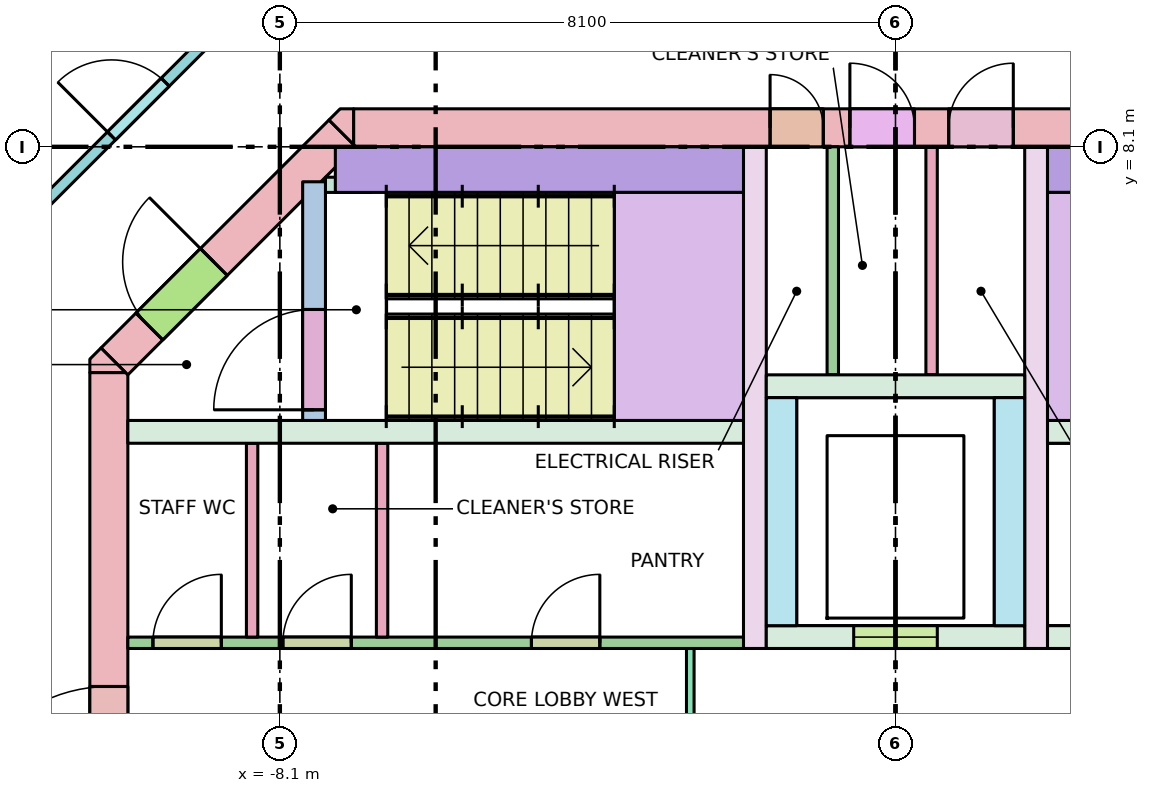
"""IFC4 building model, lengths in metres.
Left out: names, types, materials, properties, quantities, classifications, styles, units other than length and angle.
Written with IfcOpenShell. Run it as: python <this file> out.ifc"""

import sys

from ifc_helpers import new_model, si_unit, direction, frame, frame_2d, origin, place, context, subcontext, project, spatial, polyline, rectangle, outline, extrude, element, fill, save


model = new_model("IFC4")
c1 = context("Model", 3, precision=1e-05, world=origin(), true_north=direction((0.0, 1.0)))
c2 = subcontext(c1, "Body", "Model", "MODEL_VIEW")
j1 = project(units=[si_unit("LENGTHUNIT", "METRE"), si_unit("PLANEANGLEUNIT", "RADIAN")], contexts=[c1])
p1 = place(None, origin())
s1 = spatial("IfcSite", under=j1, at=p1, CompositionType="ELEMENT")
p2 = place(p1, origin())
s2 = spatial("IfcBuilding", under=s1, at=p2, CompositionType="ELEMENT")
p3 = place(p2, frame((0.0, 0.0, 253.8)))
s3 = spatial("IfcBuildingStorey", under=s2, at=p3, CompositionType="ELEMENT", Elevation=253.8)
p4 = place(p3, frame((-7.13, 8.35, -0.28), z_axis=(0.0, 0.0, 1.0), x_axis=(1.0, 0.0, 0.0)))
e1 = element("IfcWall", 1, at=p4, inside=s3, PredefinedType="SHEAR", context=c2, shape_type="SweptSolid", body=[
    extrude(rectangle(XDim=14.26, YDim=0.5, at=frame_2d((7.13, 0.0))), origin(), (0.0, 0.0, 1.0), 3.7),
])
p5 = place(p4, frame((5.48, 0.0, 0.28)))
e2 = element("IfcOpeningElement", 2, at=p5, cuts=e1, PredefinedType="OPENING", context=c2, shape_type="SweptSolid", body=[
    extrude(rectangle(XDim=0.7, YDim=2.1, at=frame_2d((0.35, 1.05))), frame((0.0, 0.26, 0.0), z_axis=(0.0, -1.0, 0.0), x_axis=(1.0, 0.0, 0.0)), (0.0, 0.0, 1.0), 0.52),
])
p6 = place(p4, frame((6.53, 0.0, 0.28)))
e3 = element("IfcOpeningElement", 3, at=p6, cuts=e1, PredefinedType="OPENING", context=c2, shape_type="SweptSolid", body=[
    extrude(rectangle(XDim=0.85, YDim=2.1, at=frame_2d((0.425, 1.05))), frame((0.0, 0.26, 0.0), z_axis=(0.0, -1.0, 0.0), x_axis=(1.0, 0.0, 0.0)), (0.0, 0.0, 1.0), 0.52),
])
p7 = place(p4, frame((7.83, 0.0, 0.28)))
e4 = element("IfcOpeningElement", 4, at=p7, cuts=e1, PredefinedType="OPENING", context=c2, shape_type="SweptSolid", body=[
    extrude(rectangle(XDim=0.85, YDim=2.1, at=frame_2d((0.425, 1.05))), frame((0.0, 0.26, 0.0), z_axis=(0.0, -1.0, 0.0), x_axis=(1.0, 0.0, 0.0)), (0.0, 0.0, 1.0), 0.52),
])
p8 = place(p3, frame((-10.35, -5.13, -0.28), z_axis=(0.0, 0.0, 1.0), x_axis=(0.0, 1.0, 0.0)))
e5 = element("IfcWall", 5, at=p8, inside=s3, PredefinedType="SHEAR", context=c2, shape_type="SweptSolid", body=[
    extrude(rectangle(XDim=10.26, YDim=0.5, at=frame_2d((5.13, 0.0))), origin(), (0.0, 0.0, 1.0), 3.7),
])
p9 = place(p8, frame((4.13, 0.0, 0.28)))
e6 = element("IfcOpeningElement", 6, at=p9, cuts=e5, PredefinedType="OPENING", context=c2, shape_type="SweptSolid", body=[
    extrude(rectangle(XDim=2.0, YDim=2.1, at=frame_2d((1.0, 1.05))), frame((0.0, 0.26, 0.0), z_axis=(0.0, -1.0, 0.0), x_axis=(1.0, 0.0, 0.0)), (0.0, 0.0, 1.0), 0.52),
])
p10 = place(p3, frame((-10.277, 5.277, -0.28), z_axis=(0.0, 0.0, 1.0), x_axis=(0.707106781187, 0.707106781187, 0.0)))
e7 = element("IfcWall", 7, at=p10, inside=s3, PredefinedType="SHEAR", context=c2, shape_type="SweptSolid", body=[
    extrude(rectangle(XDim=4.243, YDim=0.5, at=frame_2d((2.121, 0.0))), origin(), (0.0, 0.0, 1.0), 3.7),
])
p11 = place(p10, frame((0.65, 0.0, 0.28)))
e8 = element("IfcOpeningElement", 8, at=p11, cuts=e7, PredefinedType="OPENING", context=c2, shape_type="SweptSolid", body=[
    extrude(rectangle(XDim=1.2, YDim=2.1, at=frame_2d((0.6, 1.05))), frame((0.0, 0.26, 0.0), z_axis=(0.0, -1.0, 0.0), x_axis=(1.0, 0.0, 0.0)), (0.0, 0.0, 1.0), 0.52),
])
p12 = place(p3, frame((0.0, 0.0, -0.28)))
e9 = element("IfcWall", 9, at=p12, inside=s3, PredefinedType="SHEAR", context=c2, shape_type="SweptSolid", body=[
    extrude(outline(polyline([(-10.454, 5.454), (-10.13, 5.13), (-10.6, 5.13), (-10.6, 5.307), (-10.454, 5.454)])), origin(), (0.0, 0.0, 1.0), 3.7),
])
p13 = place(p3, frame((0.0, 0.0, -0.28)))
e10 = element("IfcWall", 10, at=p13, inside=s3, PredefinedType="SHEAR", context=c2, shape_type="SweptSolid", body=[
    extrude(outline(polyline([(-7.307, 8.6), (-7.13, 8.6), (-7.13, 8.13), (-7.454, 8.454), (-7.307, 8.6)])), origin(), (0.0, 0.0, 1.0), 3.7),
])
for number, where, z_axis, x_axis in (
    (11, (-10.1, 4.35, 0.0), (0.0, 0.0, 1.0), (1.0, 0.0, 0.0)),
    (12, (2.0, 4.35, 0.0), (0.0, 0.0, 1.0), (1.0, 0.0, 0.0)),
):
    element("IfcWall", number, at=place(p3, frame(where, z_axis=z_axis, x_axis=x_axis)), inside=s3, PredefinedType="SOLIDWALL", context=c2, shape_type="SweptSolid", body=[
        extrude(rectangle(XDim=8.1, YDim=0.3, at=frame_2d((4.05, 0.0))), origin(), (0.0, 0.0, 1.0), 3.42),
    ])
p14 = place(p3, frame((2.0, 1.65, 0.0), z_axis=(0.0, 0.0, 1.0), x_axis=(1.0, 0.0, 0.0)))
e13 = element("IfcWall", 13, at=p14, inside=s3, PredefinedType="SOLIDWALL", context=c2, shape_type="SweptSolid", body=[
    extrude(rectangle(XDim=8.1, YDim=0.3, at=frame_2d((4.05, 0.0))), origin(), (0.0, 0.0, 1.0), 3.42),
])
p15 = place(p14, frame((0.85, 0.0, 0.0)))
e14 = element("IfcOpeningElement", 14, at=p15, cuts=e13, PredefinedType="OPENING", context=c2, shape_type="SweptSolid", body=[
    extrude(rectangle(XDim=1.1, YDim=2.1, at=frame_2d((0.55, 1.05))), frame((0.0, 0.16, 0.0), z_axis=(0.0, -1.0, 0.0), x_axis=(1.0, 0.0, 0.0)), (0.0, 0.0, 1.0), 0.32),
])
p16 = place(p14, frame((3.5, 0.0, 0.0)))
e15 = element("IfcOpeningElement", 15, at=p16, cuts=e13, PredefinedType="OPENING", context=c2, shape_type="SweptSolid", body=[
    extrude(rectangle(XDim=1.1, YDim=2.1, at=frame_2d((0.55, 1.05))), frame((0.0, 0.16, 0.0), z_axis=(0.0, -1.0, 0.0), x_axis=(1.0, 0.0, 0.0)), (0.0, 0.0, 1.0), 0.32),
])
p17 = place(p14, frame((6.3, 0.0, 0.0)))
e16 = element("IfcOpeningElement", 16, at=p17, cuts=e13, PredefinedType="OPENING", context=c2, shape_type="SweptSolid", body=[
    extrude(rectangle(XDim=1.1, YDim=2.1, at=frame_2d((0.55, 1.05))), frame((0.0, 0.16, 0.0), z_axis=(0.0, -1.0, 0.0), x_axis=(1.0, 0.0, 0.0)), (0.0, 0.0, 1.0), 0.32),
])
for number, where, z_axis, x_axis in (
    (17, (-1.85, 1.5, 0.0), (0.0, 0.0, 1.0), (0.0, 1.0, 0.0)),
    (18, (1.85, 1.5, 0.0), (0.0, 0.0, 1.0), (0.0, 1.0, 0.0)),
):
    element("IfcWall", number, at=place(p3, frame(where, z_axis=z_axis, x_axis=x_axis)), inside=s3, PredefinedType="SHEAR", context=c2, shape_type="SweptSolid", body=[
        extrude(rectangle(XDim=6.6, YDim=0.3, at=frame_2d((3.3, 0.0))), origin(), (0.0, 0.0, 1.0), 3.42),
    ])
p18 = place(p3, frame((-1.7, 1.65, 0.0), z_axis=(0.0, 0.0, 1.0), x_axis=(1.0, 0.0, 0.0)))
e19 = element("IfcWall", 19, at=p18, inside=s3, PredefinedType="SOLIDWALL", context=c2, shape_type="SweptSolid", body=[
    extrude(rectangle(XDim=3.4, YDim=0.3, at=frame_2d((1.7, 0.0))), origin(), (0.0, 0.0, 1.0), 3.42),
])
p19 = place(p18, frame((1.15, 0.0, 0.0)))
e20 = element("IfcOpeningElement", 20, at=p19, cuts=e19, PredefinedType="OPENING", context=c2, shape_type="SweptSolid", body=[
    extrude(rectangle(XDim=1.1, YDim=2.1, at=frame_2d((0.55, 1.05))), frame((0.0, 0.16, 0.0), z_axis=(0.0, -1.0, 0.0), x_axis=(1.0, 0.0, 0.0)), (0.0, 0.0, 1.0), 0.32),
])
for number, where, z_axis, x_axis in (
    (21, (-1.5, 1.8, 0.0), (0.0, 0.0, 1.0), (0.0, 1.0, 0.0)),
    (22, (1.5, 1.8, 0.0), (0.0, 0.0, 1.0), (0.0, 1.0, 0.0)),
):
    element("IfcWall", number, at=place(p3, frame(where, z_axis=z_axis, x_axis=x_axis)), inside=s3, PredefinedType="SOLIDWALL", context=c2, shape_type="SweptSolid", body=[
        extrude(rectangle(XDim=3.0, YDim=0.4, at=frame_2d((1.5, 0.0))), origin(), (0.0, 0.0, 1.0), 3.42),
    ])
p20 = place(p3, frame((-1.7, 4.95, 0.0), z_axis=(0.0, 0.0, 1.0), x_axis=(1.0, 0.0, 0.0)))
e23 = element("IfcWall", 23, at=p20, inside=s3, PredefinedType="SOLIDWALL", context=c2, shape_type="SweptSolid", body=[
    extrude(rectangle(XDim=3.4, YDim=0.3, at=frame_2d((1.7, 0.0))), origin(), (0.0, 0.0, 1.0), 3.42),
])
p21 = place(p3, frame((-7.65, 4.5, 0.0), z_axis=(0.0, 0.0, 1.0), x_axis=(0.0, 1.0, 0.0)))
e24 = element("IfcWall", 24, at=p21, inside=s3, PredefinedType="SHEAR", context=c2, shape_type="SweptSolid", body=[
    extrude(rectangle(XDim=3.14, YDim=0.3, at=frame_2d((1.57, 0.0))), origin(), (0.0, 0.0, 1.0), 3.42),
])
p22 = place(p21, frame((0.14, 0.0, 0.0)))
e25 = element("IfcOpeningElement", 25, at=p22, cuts=e24, PredefinedType="OPENING", context=c2, shape_type="SweptSolid", body=[
    extrude(rectangle(XDim=1.32, YDim=2.1, at=frame_2d((0.66, 1.05))), frame((0.0, 0.16, 0.0), z_axis=(0.0, -1.0, 0.0), x_axis=(1.0, 0.0, 0.0)), (0.0, 0.0, 1.0), 0.32),
])
for number, where, z_axis, x_axis in (
    (26, (-7.37, 7.8, 0.0), (0.0, 0.0, 1.0), (1.0, 0.0, 0.0)),
    (27, (2.0, 7.8, 0.0), (0.0, 0.0, 1.0), (1.0, 0.0, 0.0)),
):
    element("IfcWall", number, at=place(p3, frame(where, z_axis=z_axis, x_axis=x_axis)), inside=s3, PredefinedType="SHEAR", context=c2, shape_type="SweptSolid", body=[
        extrude(rectangle(XDim=5.37, YDim=0.6, at=frame_2d((2.685, 0.0))), origin(), (0.0, 0.0, 1.0), 3.42),
    ])
p23 = place(p3, frame((-7.5, 7.6, 0.0), z_axis=(0.0, 0.0, 1.0), x_axis=(1.0, 0.0, 0.0)))
e28 = element("IfcWall", 28, at=p23, inside=s3, PredefinedType="SHEAR", context=c2, shape_type="SweptSolid", body=[
    extrude(rectangle(XDim=0.6, YDim=0.2, at=frame_2d((0.3, 0.0))), origin(), (0.0, 0.0, 1.0), 3.42),
])
p24 = place(p3, frame((-2.7, -1.5, 0.0), z_axis=(0.0, 0.0, 1.0), x_axis=(0.0, 1.0, 0.0)))
e29 = element("IfcWall", 29, at=p24, inside=s3, PredefinedType="PARTITIONING", context=c2, shape_type="SweptSolid", body=[
    extrude(rectangle(XDim=3.0, YDim=0.1, at=frame_2d((1.5, 0.0))), origin(), (0.0, 0.0, 1.0), 3.42),
])
p25 = place(p24, frame((0.9, 0.0, 0.0)))
e30 = element("IfcOpeningElement", 30, at=p25, cuts=e29, PredefinedType="OPENING", context=c2, shape_type="SweptSolid", body=[
    extrude(rectangle(XDim=1.2, YDim=2.1, at=frame_2d((0.6, 1.05))), frame((0.0, 0.06, 0.0), z_axis=(0.0, -1.0, 0.0), x_axis=(1.0, 0.0, 0.0)), (0.0, 0.0, 1.0), 0.12),
])
for number, where, z_axis, x_axis in (
    (31, (-0.825, 5.1, 0.0), (0.0, 0.0, 1.0), (0.0, 1.0, 0.0)),
    (32, (0.475, 5.1, 0.0), (0.0, 0.0, 1.0), (0.0, 1.0, 0.0)),
):
    element("IfcWall", number, at=place(p3, frame(where, z_axis=z_axis, x_axis=x_axis)), inside=s3, PredefinedType="PARTITIONING", context=c2, shape_type="SweptSolid", body=[
        extrude(rectangle(XDim=3.0, YDim=0.15, at=frame_2d((1.5, 0.0))), origin(), (0.0, 0.0, 1.0), 3.42),
    ])
for number, where, z_axis, x_axis in (
    (33, (-8.465, 1.65, 0.0), (0.0, 0.0, 1.0), (0.0, 1.0, 0.0)),
    (34, (-6.755, 1.65, 0.0), (0.0, 0.0, 1.0), (0.0, 1.0, 0.0)),
):
    element("IfcWall", number, at=place(p3, frame(where, z_axis=z_axis, x_axis=x_axis)), inside=s3, PredefinedType="PARTITIONING", context=c2, shape_type="SweptSolid", body=[
        extrude(rectangle(XDim=2.55, YDim=0.15, at=frame_2d((1.275, 0.0))), origin(), (0.0, 0.0, 1.0), 3.42),
    ])
p26 = place(p3, frame((-10.1, 1.575, 0.0), z_axis=(0.0, 0.0, 1.0), x_axis=(1.0, 0.0, 0.0)))
e35 = element("IfcWall", 35, at=p26, inside=s3, PredefinedType="PARTITIONING", context=c2, shape_type="SweptSolid", body=[
    extrude(rectangle(XDim=8.1, YDim=0.15, at=frame_2d((4.05, 0.0))), origin(), (0.0, 0.0, 1.0), 3.42),
])
p27 = place(p26, frame((0.33, 0.0, 0.0)))
e36 = element("IfcOpeningElement", 36, at=p27, cuts=e35, PredefinedType="OPENING", context=c2, shape_type="SweptSolid", body=[
    extrude(rectangle(XDim=0.9, YDim=2.1, at=frame_2d((0.45, 1.05))), frame((0.0, 0.085, 0.0), z_axis=(0.0, -1.0, 0.0), x_axis=(1.0, 0.0, 0.0)), (0.0, 0.0, 1.0), 0.17),
])
p28 = place(p26, frame((2.04, 0.0, 0.0)))
e37 = element("IfcOpeningElement", 37, at=p28, cuts=e35, PredefinedType="OPENING", context=c2, shape_type="SweptSolid", body=[
    extrude(rectangle(XDim=0.9, YDim=2.1, at=frame_2d((0.45, 1.05))), frame((0.0, 0.085, 0.0), z_axis=(0.0, -1.0, 0.0), x_axis=(1.0, 0.0, 0.0)), (0.0, 0.0, 1.0), 0.17),
])
p29 = place(p26, frame((5.31, 0.0, 0.0)))
e38 = element("IfcOpeningElement", 38, at=p29, cuts=e35, PredefinedType="OPENING", context=c2, shape_type="SweptSolid", body=[
    extrude(rectangle(XDim=0.9, YDim=2.1, at=frame_2d((0.45, 1.05))), frame((0.0, 0.085, 0.0), z_axis=(0.0, -1.0, 0.0), x_axis=(1.0, 0.0, 0.0)), (0.0, 0.0, 1.0), 0.17),
])
p30 = place(p3, frame((-12.438, 6.121, 0.0), z_axis=(0.0, 0.0, 1.0), x_axis=(0.707106781187, 0.707106781187, 0.0)))
e39 = element("IfcWall", 39, at=p30, inside=s3, PredefinedType="PARTITIONING", context=c2, shape_type="SweptSolid", body=[
    extrude(rectangle(XDim=6.105, YDim=0.15, at=frame_2d((3.053, 0.0))), origin(), (0.0, 0.0, 1.0), 2.57),
])
p31 = place(p30, frame((3.002, 0.0, 0.0)))
e40 = element("IfcOpeningElement", 40, at=p31, cuts=e39, PredefinedType="OPENING", context=c2, shape_type="SweptSolid", body=[
    extrude(rectangle(XDim=1.0, YDim=2.1, at=frame_2d((0.5, 1.05))), frame((0.0, 0.085, 0.0), z_axis=(0.0, -1.0, 0.0), x_axis=(1.0, 0.0, 0.0)), (0.0, 0.0, 1.0), 0.17),
])
p32 = place(p19, origin())
e41 = element("IfcDoor", 41, at=p32, inside=s3, OperationType="DOUBLE_DOOR_SLIDING", PredefinedType="DOOR", context=c2, shape_type="SweptSolid", body=[
    extrude(rectangle(XDim=1.1, YDim=2.1, at=frame_2d((0.55, 1.05))), frame((0.0, 0.025, 0.0), z_axis=(0.0, -1.0, 0.0), x_axis=(1.0, 0.0, 0.0)), (0.0, 0.0, 1.0), 0.05),
])
fill(e20, e41)
p33 = place(p22, origin())
e42 = element("IfcDoor", 42, at=p33, inside=s3, OperationType="DOUBLE_DOOR_SINGLE_SWING", PredefinedType="DOOR", context=c2, shape_type="SweptSolid", body=[
    extrude(rectangle(XDim=1.32, YDim=2.1, at=frame_2d((0.66, 1.05))), frame((0.0, 0.025, 0.0), z_axis=(0.0, -1.0, 0.0), x_axis=(1.0, 0.0, 0.0)), (0.0, 0.0, 1.0), 0.05),
])
fill(e25, e42)
p34 = place(p11, origin())
e43 = element("IfcDoor", 43, at=p34, inside=s3, OperationType="SINGLE_SWING_RIGHT", PredefinedType="DOOR", context=c2, shape_type="SweptSolid", body=[
    extrude(rectangle(XDim=1.2, YDim=2.1, at=frame_2d((0.6, 1.05))), frame((0.0, 0.025, 0.0), z_axis=(0.0, -1.0, 0.0), x_axis=(1.0, 0.0, 0.0)), (0.0, 0.0, 1.0), 0.05),
])
fill(e8, e43)
p35 = place(p9, origin())
e44 = element("IfcDoor", 44, at=p35, inside=s3, OperationType="DOUBLE_DOOR_SINGLE_SWING", PredefinedType="DOOR", context=c2, shape_type="SweptSolid", body=[
    extrude(rectangle(XDim=2.0, YDim=2.1, at=frame_2d((1.0, 1.05))), frame((0.0, 0.025, 0.0), z_axis=(0.0, -1.0, 0.0), x_axis=(1.0, 0.0, 0.0)), (0.0, 0.0, 1.0), 0.05),
])
fill(e6, e44)
p36 = place(p5, origin())
e45 = element("IfcDoor", 45, at=p36, inside=s3, OperationType="SINGLE_SWING_LEFT", PredefinedType="DOOR", context=c2, shape_type="SweptSolid", body=[
    extrude(rectangle(XDim=0.7, YDim=2.1, at=frame_2d((0.35, 1.05))), frame((0.0, 0.025, 0.0), z_axis=(0.0, -1.0, 0.0), x_axis=(1.0, 0.0, 0.0)), (0.0, 0.0, 1.0), 0.05),
])
fill(e2, e45)
p37 = place(p6, origin())
e46 = element("IfcDoor", 46, at=p37, inside=s3, OperationType="SINGLE_SWING_LEFT", PredefinedType="DOOR", context=c2, shape_type="SweptSolid", body=[
    extrude(rectangle(XDim=0.85, YDim=2.1, at=frame_2d((0.425, 1.05))), frame((0.0, 0.025, 0.0), z_axis=(0.0, -1.0, 0.0), x_axis=(1.0, 0.0, 0.0)), (0.0, 0.0, 1.0), 0.05),
])
fill(e3, e46)
p38 = place(p7, origin())
e47 = element("IfcDoor", 47, at=p38, inside=s3, OperationType="SINGLE_SWING_RIGHT", PredefinedType="DOOR", context=c2, shape_type="SweptSolid", body=[
    extrude(rectangle(XDim=0.85, YDim=2.1, at=frame_2d((0.425, 1.05))), frame((0.0, 0.025, 0.0), z_axis=(0.0, -1.0, 0.0), x_axis=(1.0, 0.0, 0.0)), (0.0, 0.0, 1.0), 0.05),
])
fill(e4, e47)
p39 = place(p27, origin())
e48 = element("IfcDoor", 48, at=p39, inside=s3, OperationType="SINGLE_SWING_RIGHT", PredefinedType="DOOR", context=c2, shape_type="SweptSolid", body=[
    extrude(rectangle(XDim=0.9, YDim=2.1, at=frame_2d((0.45, 1.05))), frame((0.0, 0.025, 0.0), z_axis=(0.0, -1.0, 0.0), x_axis=(1.0, 0.0, 0.0)), (0.0, 0.0, 1.0), 0.05),
])
fill(e36, e48)
p40 = place(p28, origin())
e49 = element("IfcDoor", 49, at=p40, inside=s3, OperationType="SINGLE_SWING_RIGHT", PredefinedType="DOOR", context=c2, shape_type="SweptSolid", body=[
    extrude(rectangle(XDim=0.9, YDim=2.1, at=frame_2d((0.45, 1.05))), frame((0.0, 0.025, 0.0), z_axis=(0.0, -1.0, 0.0), x_axis=(1.0, 0.0, 0.0)), (0.0, 0.0, 1.0), 0.05),
])
fill(e37, e49)
p41 = place(p29, origin())
e50 = element("IfcDoor", 50, at=p41, inside=s3, OperationType="SINGLE_SWING_RIGHT", PredefinedType="DOOR", context=c2, shape_type="SweptSolid", body=[
    extrude(rectangle(XDim=0.9, YDim=2.1, at=frame_2d((0.45, 1.05))), frame((0.0, 0.025, 0.0), z_axis=(0.0, -1.0, 0.0), x_axis=(1.0, 0.0, 0.0)), (0.0, 0.0, 1.0), 0.05),
])
fill(e38, e50)
p42 = place(p31, origin())
e51 = element("IfcDoor", 51, at=p42, inside=s3, OperationType="SINGLE_SWING_LEFT", PredefinedType="DOOR", context=c2, shape_type="SweptSolid", body=[
    extrude(rectangle(XDim=1.0, YDim=2.1, at=frame_2d((0.5, 1.05))), frame((0.0, 0.025, 0.0), z_axis=(0.0, -1.0, 0.0), x_axis=(1.0, 0.0, 0.0)), (0.0, 0.0, 1.0), 0.05),
])
fill(e40, e51)
save(model, sys.argv[1])
